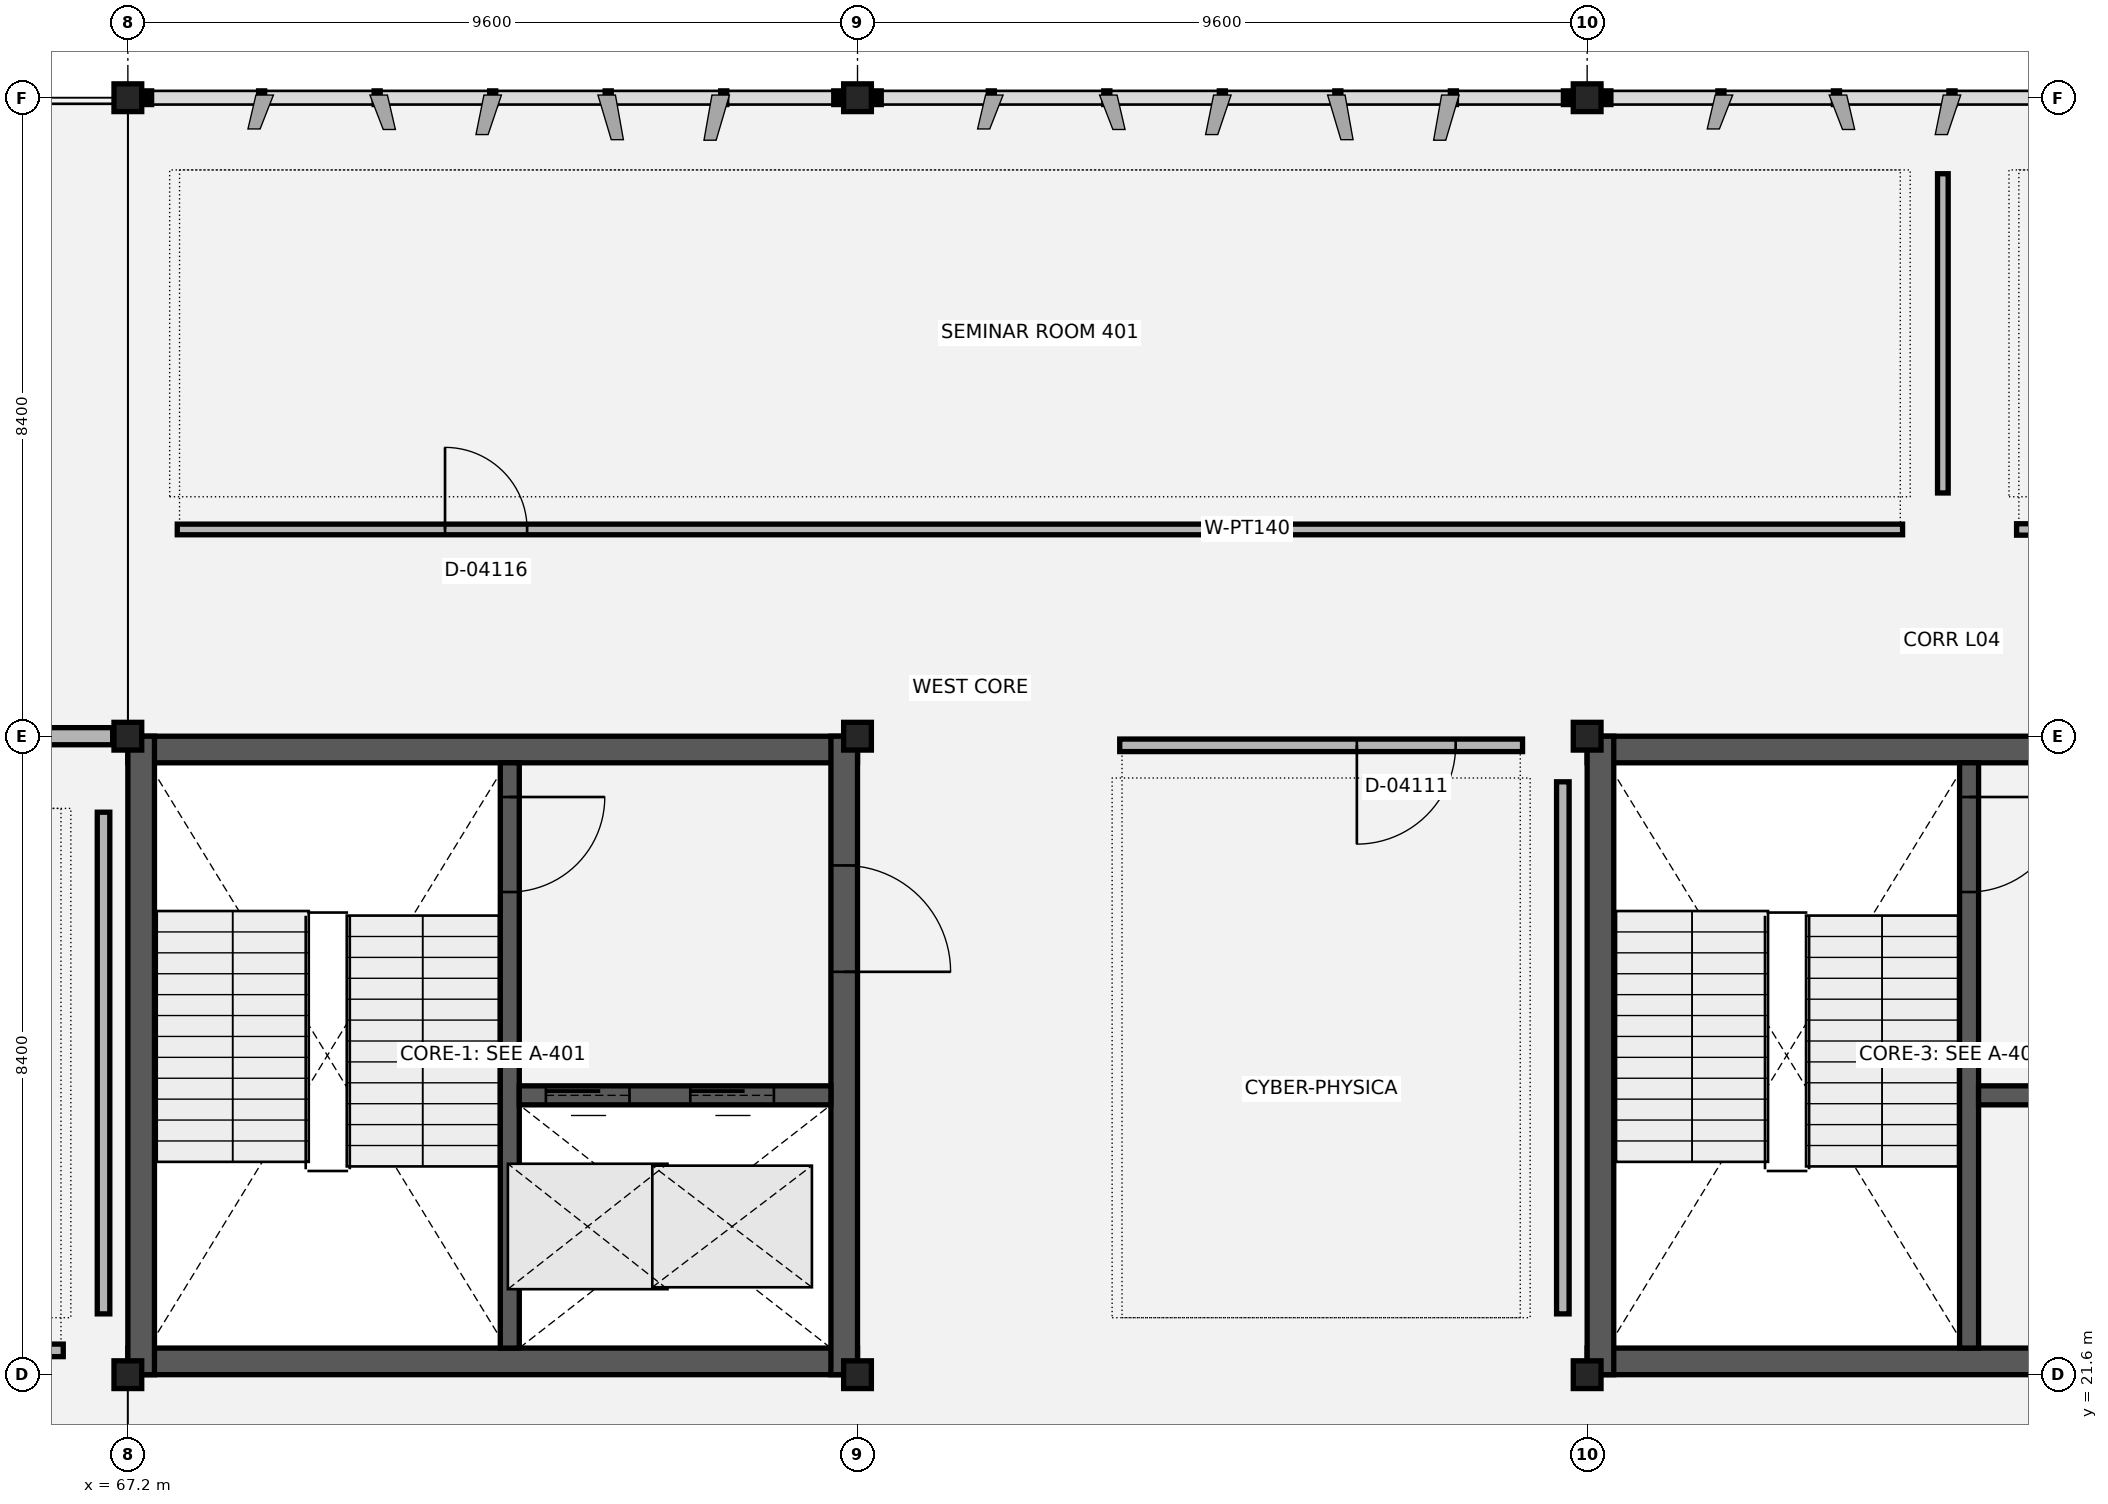
"""IFC4 building model, lengths in metres.
Left out: names, types, materials, properties, quantities, classifications, styles, units other than length and angle.
Written with IfcOpenShell. Run it as: python <this file> out.ifc"""

import sys

from ifc_helpers import new_model, si_unit, direction, frame, frame_2d, origin, origin_2d, place, context, subcontext, project, spatial, rectangle, extrude, element, fill, save


model = new_model("IFC4")
c1 = context("Model", 3, precision=1e-05, world=origin(), true_north=direction((0.0, 1.0)))
c2 = subcontext(c1, "Body", "Model", "MODEL_VIEW")
j1 = project(units=[si_unit("LENGTHUNIT", "METRE"), si_unit("PLANEANGLEUNIT", "RADIAN")], contexts=[c1])
p1 = place(None, origin())
s1 = spatial("IfcSite", under=j1, at=p1, CompositionType="ELEMENT")
p2 = place(p1, origin())
s2 = spatial("IfcBuilding", under=s1, at=p2, CompositionType="ELEMENT")
p3 = place(p2, frame((0.0, 0.0, 18.6)))
s3 = spatial("IfcBuildingStorey", under=s2, at=p3, CompositionType="ELEMENT", Elevation=18.6)
for number, where, z_axis, x_axis in (
    (1, (67.2, 21.6, 0.0), (0.0, 0.0, 1.0), (1.0, 0.0, 0.0)),
    (2, (67.2, 30.0, 0.0), (0.0, 0.0, 1.0), (1.0, 0.0, 0.0)),
    (3, (67.2, 38.4, 0.0), (0.0, 0.0, 1.0), (1.0, 0.0, 0.0)),
    (4, (76.8, 21.6, 0.0), (0.0, 0.0, 1.0), (1.0, 0.0, 0.0)),
    (5, (76.8, 30.0, 0.0), (0.0, 0.0, 1.0), (1.0, 0.0, 0.0)),
    (6, (76.8, 38.4, 0.0), (0.0, 0.0, 1.0), (1.0, 0.0, 0.0)),
    (7, (86.4, 21.6, 0.0), (0.0, 0.0, 1.0), (1.0, 0.0, 0.0)),
    (8, (86.4, 30.0, 0.0), (0.0, 0.0, 1.0), (1.0, 0.0, 0.0)),
    (9, (86.4, 38.4, 0.0), (0.0, 0.0, 1.0), (1.0, 0.0, 0.0)),
):
    element("IfcColumn", number, at=place(p3, frame(where, z_axis=z_axis, x_axis=x_axis)), inside=s3, PredefinedType="COLUMN", context=c2, shape_type="SweptSolid", body=[
        extrude(rectangle(XDim=0.365, YDim=0.365, at=origin_2d()), origin(), (0.0, 0.0, 1.0), 4.2),
    ])
p4 = place(p3, frame((67.0, 30.0, 0.0), z_axis=(0.0, 0.0, 1.0), x_axis=(-1.0, 0.0, 0.0)))
e10 = element("IfcWall", 10, at=p4, inside=s3, PredefinedType="SOLIDWALL", context=c2, shape_type="SweptSolid", body=[
    extrude(rectangle(XDim=4.4, YDim=0.225, at=frame_2d((2.2, 0.0))), origin(), (0.0, 0.0, 1.0), 3.07),
])
p5 = place(p4, frame((1.6, 0.0, 0.0)))
e11 = element("IfcOpeningElement", 11, at=p5, cuts=e10, PredefinedType="OPENING", context=c2, shape_type="SweptSolid", body=[
    extrude(rectangle(XDim=1.2, YDim=2.15, at=frame_2d((0.6, 1.075))), frame((0.0, 0.123, 0.0), z_axis=(0.0, -1.0, 0.0), x_axis=(1.0, 0.0, 0.0)), (0.0, 0.0, 1.0), 0.245),
])
for number, where, z_axis, x_axis in (
    (12, (67.2, 29.825, 0.0), (0.0, 0.0, 1.0), (1.0, 0.0, 0.0)),
    (13, (67.2, 21.775, 0.0), (0.0, 0.0, 1.0), (1.0, 0.0, 0.0)),
):
    element("IfcWall", number, at=place(p3, frame(where, z_axis=z_axis, x_axis=x_axis)), inside=s3, PredefinedType="SHEAR", context=c2, shape_type="SweptSolid", body=[
        extrude(rectangle(XDim=9.6, YDim=0.35, at=frame_2d((4.8, 0.0))), origin(), (0.0, 0.0, 1.0), 3.97),
    ])
p6 = place(p3, frame((67.375, 21.6, 0.0), z_axis=(0.0, 0.0, 1.0), x_axis=(0.0, 1.0, 0.0)))
e14 = element("IfcWall", 14, at=p6, inside=s3, PredefinedType="SHEAR", context=c2, shape_type="SweptSolid", body=[
    extrude(rectangle(XDim=8.4, YDim=0.35, at=frame_2d((4.2, 0.0))), origin(), (0.0, 0.0, 1.0), 3.97),
])
p7 = place(p3, frame((76.625, 21.6, 0.0), z_axis=(0.0, 0.0, 1.0), x_axis=(0.0, 1.0, 0.0)))
e15 = element("IfcWall", 15, at=p7, inside=s3, PredefinedType="SHEAR", context=c2, shape_type="SweptSolid", body=[
    extrude(rectangle(XDim=8.4, YDim=0.35, at=frame_2d((4.2, 0.0))), origin(), (0.0, 0.0, 1.0), 3.97),
])
p8 = place(p7, frame((5.3, 0.0, 0.0)))
e16 = element("IfcOpeningElement", 16, at=p8, cuts=e15, PredefinedType="OPENING", context=c2, shape_type="SweptSolid", body=[
    extrude(rectangle(XDim=1.4, YDim=2.15, at=frame_2d((0.7, 1.075))), frame((0.0, 0.185, 0.0), z_axis=(0.0, -1.0, 0.0), x_axis=(1.0, 0.0, 0.0)), (0.0, 0.0, 1.0), 0.37),
])
p9 = place(p3, frame((72.225, 29.65, 0.0), z_axis=(0.0, 0.0, 1.0), x_axis=(0.0, -1.0, 0.0)))
e17 = element("IfcWall", 17, at=p9, inside=s3, PredefinedType="SHEAR", context=c2, shape_type="SweptSolid", body=[
    extrude(rectangle(XDim=7.7, YDim=0.25, at=frame_2d((3.85, 0.0))), origin(), (0.0, 0.0, 1.0), 3.97),
])
p10 = place(p9, frame((0.45, 0.0, 0.0)))
e18 = element("IfcOpeningElement", 18, at=p10, cuts=e17, PredefinedType="OPENING", context=c2, shape_type="SweptSolid", body=[
    extrude(rectangle(XDim=1.25, YDim=2.15, at=frame_2d((0.625, 1.075))), frame((0.0, 0.135, 0.0), z_axis=(0.0, -1.0, 0.0), x_axis=(1.0, 0.0, 0.0)), (0.0, 0.0, 1.0), 0.27),
])
p11 = place(p3, frame((72.35, 25.275, 0.0), z_axis=(0.0, 0.0, 1.0), x_axis=(1.0, 0.0, 0.0)))
e19 = element("IfcWall", 19, at=p11, inside=s3, PredefinedType="SHEAR", context=c2, shape_type="SweptSolid", body=[
    extrude(rectangle(XDim=4.1, YDim=0.25, at=frame_2d((2.05, 0.0))), origin(), (0.0, 0.0, 1.0), 3.97),
])
p12 = place(p11, frame((0.35, 0.0, 0.0)))
e20 = element("IfcOpeningElement", 20, at=p12, cuts=e19, PredefinedType="OPENING", context=c2, shape_type="SweptSolid", body=[
    extrude(rectangle(XDim=1.1, YDim=2.15, at=frame_2d((0.55, 1.075))), frame((0.0, 0.135, 0.0), z_axis=(0.0, -1.0, 0.0), x_axis=(1.0, 0.0, 0.0)), (0.0, 0.0, 1.0), 0.27),
])
p13 = place(p11, frame((2.25, 0.0, 0.0)))
e21 = element("IfcOpeningElement", 21, at=p13, cuts=e19, PredefinedType="OPENING", context=c2, shape_type="SweptSolid", body=[
    extrude(rectangle(XDim=1.1, YDim=2.15, at=frame_2d((0.55, 1.075))), frame((0.0, 0.135, 0.0), z_axis=(0.0, -1.0, 0.0), x_axis=(1.0, 0.0, 0.0)), (0.0, 0.0, 1.0), 0.27),
])
for number, where, z_axis, x_axis in (
    (22, (86.4, 29.825, 0.0), (0.0, 0.0, 1.0), (1.0, 0.0, 0.0)),
    (23, (86.4, 21.775, 0.0), (0.0, 0.0, 1.0), (1.0, 0.0, 0.0)),
):
    element("IfcWall", number, at=place(p3, frame(where, z_axis=z_axis, x_axis=x_axis)), inside=s3, PredefinedType="SHEAR", context=c2, shape_type="SweptSolid", body=[
        extrude(rectangle(XDim=9.6, YDim=0.35, at=frame_2d((4.8, 0.0))), origin(), (0.0, 0.0, 1.0), 3.97),
    ])
p14 = place(p3, frame((86.575, 21.6, 0.0), z_axis=(0.0, 0.0, 1.0), x_axis=(0.0, 1.0, 0.0)))
e24 = element("IfcWall", 24, at=p14, inside=s3, PredefinedType="SHEAR", context=c2, shape_type="SweptSolid", body=[
    extrude(rectangle(XDim=8.4, YDim=0.35, at=frame_2d((4.2, 0.0))), origin(), (0.0, 0.0, 1.0), 3.97),
])
p15 = place(p3, frame((91.425, 29.65, 0.0), z_axis=(0.0, 0.0, 1.0), x_axis=(0.0, -1.0, 0.0)))
e25 = element("IfcWall", 25, at=p15, inside=s3, PredefinedType="SHEAR", context=c2, shape_type="SweptSolid", body=[
    extrude(rectangle(XDim=7.7, YDim=0.25, at=frame_2d((3.85, 0.0))), origin(), (0.0, 0.0, 1.0), 3.97),
])
p16 = place(p15, frame((0.45, 0.0, 0.0)))
e26 = element("IfcOpeningElement", 26, at=p16, cuts=e25, PredefinedType="OPENING", context=c2, shape_type="SweptSolid", body=[
    extrude(rectangle(XDim=1.25, YDim=2.15, at=frame_2d((0.625, 1.075))), frame((0.0, 0.135, 0.0), z_axis=(0.0, -1.0, 0.0), x_axis=(1.0, 0.0, 0.0)), (0.0, 0.0, 1.0), 0.27),
])
p17 = place(p3, frame((91.55, 25.275, 0.0), z_axis=(0.0, 0.0, 1.0), x_axis=(1.0, 0.0, 0.0)))
e27 = element("IfcWall", 27, at=p17, inside=s3, PredefinedType="SHEAR", context=c2, shape_type="SweptSolid", body=[
    extrude(rectangle(XDim=4.1, YDim=0.25, at=frame_2d((2.05, 0.0))), origin(), (0.0, 0.0, 1.0), 3.97),
])
p18 = place(p17, frame((1.4, 0.0, 0.0)))
e28 = element("IfcOpeningElement", 28, at=p18, cuts=e27, PredefinedType="OPENING", context=c2, shape_type="SweptSolid", body=[
    extrude(rectangle(XDim=1.2, YDim=2.15, at=frame_2d((0.6, 1.075))), frame((0.0, 0.135, 0.0), z_axis=(0.0, -1.0, 0.0), x_axis=(1.0, 0.0, 0.0)), (0.0, 0.0, 1.0), 0.27),
])
p19 = place(p3, frame((58.65, 21.92, 0.0), z_axis=(0.0, 0.0, 1.0), x_axis=(1.0, 0.0, 0.0)))
e29 = element("IfcWall", 29, at=p19, inside=s3, PredefinedType="PARTITIONING", context=c2, shape_type="SweptSolid", body=[
    extrude(rectangle(XDim=7.7, YDim=0.165, at=frame_2d((3.85, 0.0))), origin(), (0.0, 0.0, 1.0), 3.05),
])
p20 = place(p19, frame((5.16, 0.0, 0.0)))
e30 = element("IfcOpeningElement", 30, at=p20, cuts=e29, PredefinedType="OPENING", context=c2, shape_type="SweptSolid", body=[
    extrude(rectangle(XDim=1.3, YDim=2.15, at=frame_2d((0.65, 1.075))), frame((0.0, 0.093, 0.0), z_axis=(0.0, -1.0, 0.0), x_axis=(1.0, 0.0, 0.0)), (0.0, 0.0, 1.0), 0.185),
])
p21 = place(p3, frame((66.88, 22.4, 0.0), z_axis=(0.0, 0.0, 1.0), x_axis=(0.0, 1.0, 0.0)))
e31 = element("IfcWall", 31, at=p21, inside=s3, PredefinedType="PARTITIONING", context=c2, shape_type="SweptSolid", body=[
    extrude(rectangle(XDim=6.6, YDim=0.165, at=frame_2d((3.3, 0.0))), origin(), (0.0, 0.0, 1.0), 3.05),
])
p22 = place(p3, frame((80.25, 29.88, 0.0), z_axis=(0.0, 0.0, 1.0), x_axis=(1.0, 0.0, 0.0)))
e32 = element("IfcWall", 32, at=p22, inside=s3, PredefinedType="PARTITIONING", context=c2, shape_type="SweptSolid", body=[
    extrude(rectangle(XDim=5.3, YDim=0.165, at=frame_2d((2.65, 0.0))), origin(), (0.0, 0.0, 1.0), 3.05),
])
p23 = place(p22, frame((3.12, 0.0, 0.0)))
e33 = element("IfcOpeningElement", 33, at=p23, cuts=e32, PredefinedType="OPENING", context=c2, shape_type="SweptSolid", body=[
    extrude(rectangle(XDim=1.3, YDim=2.15, at=frame_2d((0.65, 1.075))), frame((0.0, 0.093, 0.0), z_axis=(0.0, -1.0, 0.0), x_axis=(1.0, 0.0, 0.0)), (0.0, 0.0, 1.0), 0.185),
])
p24 = place(p3, frame((86.08, 22.4, 0.0), z_axis=(0.0, 0.0, 1.0), x_axis=(0.0, 1.0, 0.0)))
e34 = element("IfcWall", 34, at=p24, inside=s3, PredefinedType="PARTITIONING", context=c2, shape_type="SweptSolid", body=[
    extrude(rectangle(XDim=7.0, YDim=0.165, at=frame_2d((3.5, 0.0))), origin(), (0.0, 0.0, 1.0), 3.05),
])
p25 = place(p3, frame((67.85, 32.72, 0.0), z_axis=(0.0, 0.0, 1.0), x_axis=(1.0, 0.0, 0.0)))
e35 = element("IfcWall", 35, at=p25, inside=s3, PredefinedType="PARTITIONING", context=c2, shape_type="SweptSolid", body=[
    extrude(rectangle(XDim=22.7, YDim=0.14, at=frame_2d((11.35, 0.0))), origin(), (0.0, 0.0, 1.0), 3.05),
])
p26 = place(p25, frame((3.523, 0.0, 0.0)))
e36 = element("IfcOpeningElement", 36, at=p26, cuts=e35, PredefinedType="OPENING", context=c2, shape_type="SweptSolid", body=[
    extrude(rectangle(XDim=1.08, YDim=2.15, at=frame_2d((0.54, 1.075))), frame((0.0, 0.08, 0.0), z_axis=(0.0, -1.0, 0.0), x_axis=(1.0, 0.0, 0.0)), (0.0, 0.0, 1.0), 0.16),
])
p27 = place(p3, frame((91.08, 33.2, 0.0), z_axis=(0.0, 0.0, 1.0), x_axis=(0.0, 1.0, 0.0)))
e37 = element("IfcWall", 37, at=p27, inside=s3, PredefinedType="PARTITIONING", context=c2, shape_type="SweptSolid", body=[
    extrude(rectangle(XDim=4.2, YDim=0.14, at=frame_2d((2.1, 0.0))), origin(), (0.0, 0.0, 1.0), 3.05),
])
p28 = place(p3, frame((92.05, 32.72, 0.0), z_axis=(0.0, 0.0, 1.0), x_axis=(1.0, 0.0, 0.0)))
e38 = element("IfcWall", 38, at=p28, inside=s3, PredefinedType="PARTITIONING", context=c2, shape_type="SweptSolid", body=[
    extrude(rectangle(XDim=22.3, YDim=0.15, at=frame_2d((11.15, 0.0))), origin(), (0.0, 0.0, 1.0), 3.05),
])
p29 = place(p28, frame((17.723, 0.0, 0.0)))
e39 = element("IfcOpeningElement", 39, at=p29, cuts=e38, PredefinedType="OPENING", context=c2, shape_type="SweptSolid", body=[
    extrude(rectangle(XDim=1.12, YDim=2.15, at=frame_2d((0.56, 1.075))), frame((0.0, 0.085, 0.0), z_axis=(0.0, -1.0, 0.0), x_axis=(1.0, 0.0, 0.0)), (0.0, 0.0, 1.0), 0.17),
])
p30 = place(p10, origin())
e40 = element("IfcDoor", 40, at=p30, inside=s3, OperationType="SINGLE_SWING_LEFT", PredefinedType="DOOR", context=c2, shape_type="SweptSolid", body=[
    extrude(rectangle(XDim=1.25, YDim=2.15, at=frame_2d((0.625, 1.075))), frame((0.0, 0.025, 0.0), z_axis=(0.0, -1.0, 0.0), x_axis=(1.0, 0.0, 0.0)), (0.0, 0.0, 1.0), 0.05),
])
fill(e18, e40)
p31 = place(p12, origin())
e41 = element("IfcDoor", 41, at=p31, inside=s3, OperationType="SLIDING_TO_LEFT", PredefinedType="DOOR", context=c2, shape_type="SweptSolid", body=[
    extrude(rectangle(XDim=1.1, YDim=2.15, at=frame_2d((0.55, 1.075))), frame((0.0, 0.025, 0.0), z_axis=(0.0, -1.0, 0.0), x_axis=(1.0, 0.0, 0.0)), (0.0, 0.0, 1.0), 0.05),
])
fill(e20, e41)
p32 = place(p13, origin())
e42 = element("IfcDoor", 42, at=p32, inside=s3, OperationType="SLIDING_TO_LEFT", PredefinedType="DOOR", context=c2, shape_type="SweptSolid", body=[
    extrude(rectangle(XDim=1.1, YDim=2.15, at=frame_2d((0.55, 1.075))), frame((0.0, 0.025, 0.0), z_axis=(0.0, -1.0, 0.0), x_axis=(1.0, 0.0, 0.0)), (0.0, 0.0, 1.0), 0.05),
])
fill(e21, e42)
p33 = place(p8, origin())
e43 = element("IfcDoor", 43, at=p33, inside=s3, OperationType="SINGLE_SWING_RIGHT", PredefinedType="DOOR", context=c2, shape_type="SweptSolid", body=[
    extrude(rectangle(XDim=1.4, YDim=2.15, at=frame_2d((0.7, 1.075))), frame((0.0, 0.025, 0.0), z_axis=(0.0, -1.0, 0.0), x_axis=(1.0, 0.0, 0.0)), (0.0, 0.0, 1.0), 0.05),
])
fill(e16, e43)
p34 = place(p16, origin())
e44 = element("IfcDoor", 44, at=p34, inside=s3, OperationType="SINGLE_SWING_LEFT", PredefinedType="DOOR", context=c2, shape_type="SweptSolid", body=[
    extrude(rectangle(XDim=1.25, YDim=2.15, at=frame_2d((0.625, 1.075))), frame((0.0, 0.025, 0.0), z_axis=(0.0, -1.0, 0.0), x_axis=(1.0, 0.0, 0.0)), (0.0, 0.0, 1.0), 0.05),
])
fill(e26, e44)
p35 = place(p23, origin())
e45 = element("IfcDoor", 45, at=p35, inside=s3, OperationType="SINGLE_SWING_RIGHT", PredefinedType="DOOR", context=c2, shape_type="SweptSolid", body=[
    extrude(rectangle(XDim=1.3, YDim=2.15, at=frame_2d((0.65, 1.075))), frame((0.0, 0.025, 0.0), z_axis=(0.0, -1.0, 0.0), x_axis=(1.0, 0.0, 0.0)), (0.0, 0.0, 1.0), 0.05),
])
fill(e33, e45)
p36 = place(p26, origin())
e46 = element("IfcDoor", 46, at=p36, inside=s3, OperationType="SINGLE_SWING_LEFT", PredefinedType="DOOR", context=c2, shape_type="SweptSolid", body=[
    extrude(rectangle(XDim=1.08, YDim=2.15, at=frame_2d((0.54, 1.075))), frame((0.0, 0.025, 0.0), z_axis=(0.0, -1.0, 0.0), x_axis=(1.0, 0.0, 0.0)), (0.0, 0.0, 1.0), 0.05),
])
fill(e36, e46)
save(model, sys.argv[1])
